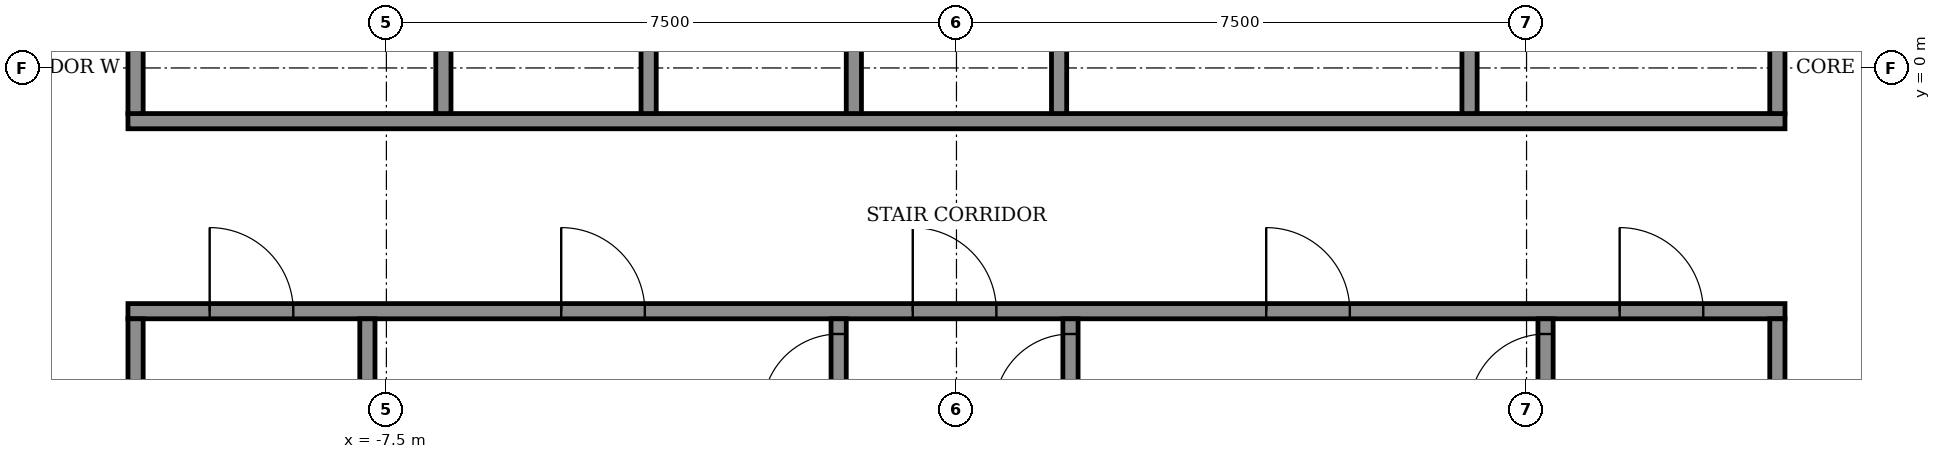
"""IFC4 building model, lengths in metres.
Left out: names, types, materials, properties, quantities, classifications, styles, units other than length and angle.
Written with IfcOpenShell. Run it as: python <this file> out.ifc"""

import sys

from ifc_helpers import new_model, si_unit, direction, frame, frame_2d, origin, place, context, subcontext, project, spatial, rectangle, extrude, element, fill, save


model = new_model("IFC4")
c1 = context("Model", 3, precision=1e-05, world=origin(), true_north=direction((0.0, 1.0)))
c2 = subcontext(c1, "Body", "Model", "MODEL_VIEW")
j1 = project(units=[si_unit("LENGTHUNIT", "METRE"), si_unit("PLANEANGLEUNIT", "RADIAN")], contexts=[c1])
p1 = place(None, origin())
s1 = spatial("IfcSite", under=j1, at=p1, CompositionType="ELEMENT")
p2 = place(p1, origin())
s2 = spatial("IfcBuilding", under=s1, at=p2, CompositionType="ELEMENT")
p3 = place(p2, frame((0.0, 0.0, 350.7)))
s3 = spatial("IfcBuildingStorey", under=s2, at=p3, CompositionType="ELEMENT", Elevation=350.7)
p4 = place(p3, frame((-10.9, -3.2, 0.0), z_axis=(0.0, 0.0, 1.0), x_axis=(1.0, 0.0, 0.0)))
e1 = element("IfcWall", 1, at=p4, inside=s3, PredefinedType="SHEAR", context=c2, shape_type="SweptSolid", body=[
    extrude(rectangle(XDim=21.8, YDim=0.2, at=frame_2d((10.9, 0.0))), origin(), (0.0, 0.0, 1.0), 3.05),
])
p5 = place(p4, frame((1.075, 0.0, 0.0)))
e2 = element("IfcOpeningElement", 2, at=p5, cuts=e1, PredefinedType="OPENING", context=c2, shape_type="SweptSolid", body=[
    extrude(rectangle(XDim=1.1, YDim=2.1, at=frame_2d((0.55, 1.05))), frame((0.0, 0.11, 0.0), z_axis=(0.0, -1.0, 0.0), x_axis=(1.0, 0.0, 0.0)), (0.0, 0.0, 1.0), 0.22),
])
p6 = place(p4, frame((10.325, 0.0, 0.0)))
e3 = element("IfcOpeningElement", 3, at=p6, cuts=e1, PredefinedType="OPENING", context=c2, shape_type="SweptSolid", body=[
    extrude(rectangle(XDim=1.1, YDim=2.1, at=frame_2d((0.55, 1.05))), frame((0.0, 0.11, 0.0), z_axis=(0.0, -1.0, 0.0), x_axis=(1.0, 0.0, 0.0)), (0.0, 0.0, 1.0), 0.22),
])
p7 = place(p4, frame((19.625, 0.0, 0.0)))
e4 = element("IfcOpeningElement", 4, at=p7, cuts=e1, PredefinedType="OPENING", context=c2, shape_type="SweptSolid", body=[
    extrude(rectangle(XDim=1.1, YDim=2.1, at=frame_2d((0.55, 1.05))), frame((0.0, 0.11, 0.0), z_axis=(0.0, -1.0, 0.0), x_axis=(1.0, 0.0, 0.0)), (0.0, 0.0, 1.0), 0.22),
])
p8 = place(p4, frame((5.7, 0.0, 0.0)))
e5 = element("IfcOpeningElement", 5, at=p8, cuts=e1, PredefinedType="OPENING", context=c2, shape_type="SweptSolid", body=[
    extrude(rectangle(XDim=1.1, YDim=2.1, at=frame_2d((0.55, 1.05))), frame((0.0, 0.11, 0.0), z_axis=(0.0, -1.0, 0.0), x_axis=(1.0, 0.0, 0.0)), (0.0, 0.0, 1.0), 0.22),
])
p9 = place(p4, frame((14.975, 0.0, 0.0)))
e6 = element("IfcOpeningElement", 6, at=p9, cuts=e1, PredefinedType="OPENING", context=c2, shape_type="SweptSolid", body=[
    extrude(rectangle(XDim=1.1, YDim=2.1, at=frame_2d((0.55, 1.05))), frame((0.0, 0.11, 0.0), z_axis=(0.0, -1.0, 0.0), x_axis=(1.0, 0.0, 0.0)), (0.0, 0.0, 1.0), 0.22),
])
p10 = place(p3, frame((-10.9, -0.7, 0.0), z_axis=(0.0, 0.0, 1.0), x_axis=(1.0, 0.0, 0.0)))
e7 = element("IfcWall", 7, at=p10, inside=s3, PredefinedType="SHEAR", context=c2, shape_type="SweptSolid", body=[
    extrude(rectangle(XDim=21.8, YDim=0.2, at=frame_2d((10.9, 0.0))), origin(), (0.0, 0.0, 1.0), 3.05),
])
for number, where, z_axis, x_axis in (
    (8, (-10.8, -10.8, 0.0), (0.0, 0.0, 1.0), (0.0, 1.0, 0.0)),
    (9, (-7.75, -10.8, 0.0), (0.0, 0.0, 1.0), (0.0, 1.0, 0.0)),
):
    element("IfcWall", number, at=place(p3, frame(where, z_axis=z_axis, x_axis=x_axis)), inside=s3, PredefinedType="SHEAR", context=c2, shape_type="SweptSolid", body=[
        extrude(rectangle(XDim=7.5, YDim=0.2, at=frame_2d((3.75, 0.0))), origin(), (0.0, 0.0, 1.0), 3.05),
    ])
p11 = place(p3, frame((-1.55, -10.8, 0.0), z_axis=(0.0, 0.0, 1.0), x_axis=(0.0, 1.0, 0.0)))
e10 = element("IfcWall", 10, at=p11, inside=s3, PredefinedType="SHEAR", context=c2, shape_type="SweptSolid", body=[
    extrude(rectangle(XDim=7.5, YDim=0.2, at=frame_2d((3.75, 0.0))), origin(), (0.0, 0.0, 1.0), 3.05),
])
p12 = place(p11, frame((6.3, 0.0, 0.0)))
e11 = element("IfcOpeningElement", 11, at=p12, cuts=e10, PredefinedType="OPENING", context=c2, shape_type="SweptSolid", body=[
    extrude(rectangle(XDim=1.0, YDim=2.1, at=frame_2d((0.5, 1.05))), frame((0.0, 0.11, 0.0), z_axis=(0.0, -1.0, 0.0), x_axis=(1.0, 0.0, 0.0)), (0.0, 0.0, 1.0), 0.22),
])
p13 = place(p3, frame((1.5, -10.8, 0.0), z_axis=(0.0, 0.0, 1.0), x_axis=(0.0, 1.0, 0.0)))
e12 = element("IfcWall", 12, at=p13, inside=s3, PredefinedType="SHEAR", context=c2, shape_type="SweptSolid", body=[
    extrude(rectangle(XDim=7.5, YDim=0.2, at=frame_2d((3.75, 0.0))), origin(), (0.0, 0.0, 1.0), 3.05),
])
p14 = place(p13, frame((6.3, 0.0, 0.0)))
e13 = element("IfcOpeningElement", 13, at=p14, cuts=e12, PredefinedType="OPENING", context=c2, shape_type="SweptSolid", body=[
    extrude(rectangle(XDim=1.0, YDim=2.1, at=frame_2d((0.5, 1.05))), frame((0.0, 0.11, 0.0), z_axis=(0.0, -1.0, 0.0), x_axis=(1.0, 0.0, 0.0)), (0.0, 0.0, 1.0), 0.22),
])
p15 = place(p3, frame((7.75, -10.8, 0.0), z_axis=(0.0, 0.0, 1.0), x_axis=(0.0, 1.0, 0.0)))
e14 = element("IfcWall", 14, at=p15, inside=s3, PredefinedType="SHEAR", context=c2, shape_type="SweptSolid", body=[
    extrude(rectangle(XDim=7.5, YDim=0.2, at=frame_2d((3.75, 0.0))), origin(), (0.0, 0.0, 1.0), 3.05),
])
p16 = place(p15, frame((6.3, 0.0, 0.0)))
e15 = element("IfcOpeningElement", 15, at=p16, cuts=e14, PredefinedType="OPENING", context=c2, shape_type="SweptSolid", body=[
    extrude(rectangle(XDim=1.0, YDim=2.1, at=frame_2d((0.5, 1.05))), frame((0.0, 0.11, 0.0), z_axis=(0.0, -1.0, 0.0), x_axis=(1.0, 0.0, 0.0)), (0.0, 0.0, 1.0), 0.22),
])
p17 = place(p3, frame((10.8, -10.8, 0.0), z_axis=(0.0, 0.0, 1.0), x_axis=(0.0, 1.0, 0.0)))
e16 = element("IfcWall", 16, at=p17, inside=s3, PredefinedType="SHEAR", context=c2, shape_type="SweptSolid", body=[
    extrude(rectangle(XDim=7.5, YDim=0.2, at=frame_2d((3.75, 0.0))), origin(), (0.0, 0.0, 1.0), 3.05),
])
p18 = place(p3, frame((-10.8, -0.6, 0.0), z_axis=(0.0, 0.0, 1.0), x_axis=(0.0, 1.0, 0.0)))
e17 = element("IfcWall", 17, at=p18, inside=s3, PredefinedType="STANDARD", context=c2, shape_type="SweptSolid", body=[
    extrude(rectangle(XDim=2.5, YDim=0.2, at=frame_2d((1.25, 0.0))), origin(), (0.0, 0.0, 1.0), 3.05),
])
for number, where, z_axis, x_axis in (
    (18, (-6.75, -0.6, 0.0), (0.0, 0.0, 1.0), (0.0, 1.0, 0.0)),
    (19, (-4.05, -0.6, 0.0), (0.0, 0.0, 1.0), (0.0, 1.0, 0.0)),
    (20, (-1.35, -0.6, 0.0), (0.0, 0.0, 1.0), (0.0, 1.0, 0.0)),
    (21, (1.35, -0.6, 0.0), (0.0, 0.0, 1.0), (0.0, 1.0, 0.0)),
):
    element("IfcWall", number, at=place(p3, frame(where, z_axis=z_axis, x_axis=x_axis)), inside=s3, PredefinedType="SHEAR", context=c2, shape_type="SweptSolid", body=[
        extrude(rectangle(XDim=2.5, YDim=0.2, at=frame_2d((1.25, 0.0))), origin(), (0.0, 0.0, 1.0), 3.05),
    ])
for number, where, z_axis, x_axis in (
    (22, (6.75, -0.6, 0.0), (0.0, 0.0, 1.0), (0.0, 1.0, 0.0)),
    (23, (10.8, -0.6, 0.0), (0.0, 0.0, 1.0), (0.0, 1.0, 0.0)),
):
    element("IfcWall", number, at=place(p3, frame(where, z_axis=z_axis, x_axis=x_axis)), inside=s3, PredefinedType="STANDARD", context=c2, shape_type="SweptSolid", body=[
        extrude(rectangle(XDim=2.5, YDim=0.2, at=frame_2d((1.25, 0.0))), origin(), (0.0, 0.0, 1.0), 3.05),
    ])
p19 = place(p5, origin())
e24 = element("IfcDoor", 24, at=p19, inside=s3, OperationType="SINGLE_SWING_RIGHT", PredefinedType="DOOR", context=c2, shape_type="SweptSolid", body=[
    extrude(rectangle(XDim=1.1, YDim=2.1, at=frame_2d((0.55, 1.05))), frame((0.0, 0.025, 0.0), z_axis=(0.0, -1.0, 0.0), x_axis=(1.0, 0.0, 0.0)), (0.0, 0.0, 1.0), 0.05),
])
fill(e2, e24)
p20 = place(p6, origin())
e25 = element("IfcDoor", 25, at=p20, inside=s3, OperationType="SINGLE_SWING_RIGHT", PredefinedType="DOOR", context=c2, shape_type="SweptSolid", body=[
    extrude(rectangle(XDim=1.1, YDim=2.1, at=frame_2d((0.55, 1.05))), frame((0.0, 0.025, 0.0), z_axis=(0.0, -1.0, 0.0), x_axis=(1.0, 0.0, 0.0)), (0.0, 0.0, 1.0), 0.05),
])
fill(e3, e25)
p21 = place(p7, origin())
e26 = element("IfcDoor", 26, at=p21, inside=s3, OperationType="SINGLE_SWING_RIGHT", PredefinedType="DOOR", context=c2, shape_type="SweptSolid", body=[
    extrude(rectangle(XDim=1.1, YDim=2.1, at=frame_2d((0.55, 1.05))), frame((0.0, 0.025, 0.0), z_axis=(0.0, -1.0, 0.0), x_axis=(1.0, 0.0, 0.0)), (0.0, 0.0, 1.0), 0.05),
])
fill(e4, e26)
p22 = place(p8, origin())
e27 = element("IfcDoor", 27, at=p22, inside=s3, OperationType="SINGLE_SWING_LEFT", PredefinedType="DOOR", context=c2, shape_type="SweptSolid", body=[
    extrude(rectangle(XDim=1.1, YDim=2.1, at=frame_2d((0.55, 1.05))), frame((0.0, 0.025, 0.0), z_axis=(0.0, -1.0, 0.0), x_axis=(1.0, 0.0, 0.0)), (0.0, 0.0, 1.0), 0.05),
])
fill(e5, e27)
p23 = place(p9, origin())
e28 = element("IfcDoor", 28, at=p23, inside=s3, OperationType="SINGLE_SWING_LEFT", PredefinedType="DOOR", context=c2, shape_type="SweptSolid", body=[
    extrude(rectangle(XDim=1.1, YDim=2.1, at=frame_2d((0.55, 1.05))), frame((0.0, 0.025, 0.0), z_axis=(0.0, -1.0, 0.0), x_axis=(1.0, 0.0, 0.0)), (0.0, 0.0, 1.0), 0.05),
])
fill(e6, e28)
p24 = place(p12, origin())
e29 = element("IfcDoor", 29, at=p24, inside=s3, OperationType="SINGLE_SWING_RIGHT", PredefinedType="DOOR", context=c2, shape_type="SweptSolid", body=[
    extrude(rectangle(XDim=1.0, YDim=2.1, at=frame_2d((0.5, 1.05))), frame((0.0, 0.025, 0.0), z_axis=(0.0, -1.0, 0.0), x_axis=(1.0, 0.0, 0.0)), (0.0, 0.0, 1.0), 0.05),
])
fill(e11, e29)
p25 = place(p14, origin())
e30 = element("IfcDoor", 30, at=p25, inside=s3, OperationType="SINGLE_SWING_RIGHT", PredefinedType="DOOR", context=c2, shape_type="SweptSolid", body=[
    extrude(rectangle(XDim=1.0, YDim=2.1, at=frame_2d((0.5, 1.05))), frame((0.0, 0.025, 0.0), z_axis=(0.0, -1.0, 0.0), x_axis=(1.0, 0.0, 0.0)), (0.0, 0.0, 1.0), 0.05),
])
fill(e13, e30)
p26 = place(p16, origin())
e31 = element("IfcDoor", 31, at=p26, inside=s3, OperationType="SINGLE_SWING_RIGHT", PredefinedType="DOOR", context=c2, shape_type="SweptSolid", body=[
    extrude(rectangle(XDim=1.0, YDim=2.1, at=frame_2d((0.5, 1.05))), frame((0.0, 0.025, 0.0), z_axis=(0.0, -1.0, 0.0), x_axis=(1.0, 0.0, 0.0)), (0.0, 0.0, 1.0), 0.05),
])
fill(e15, e31)
save(model, sys.argv[1])
